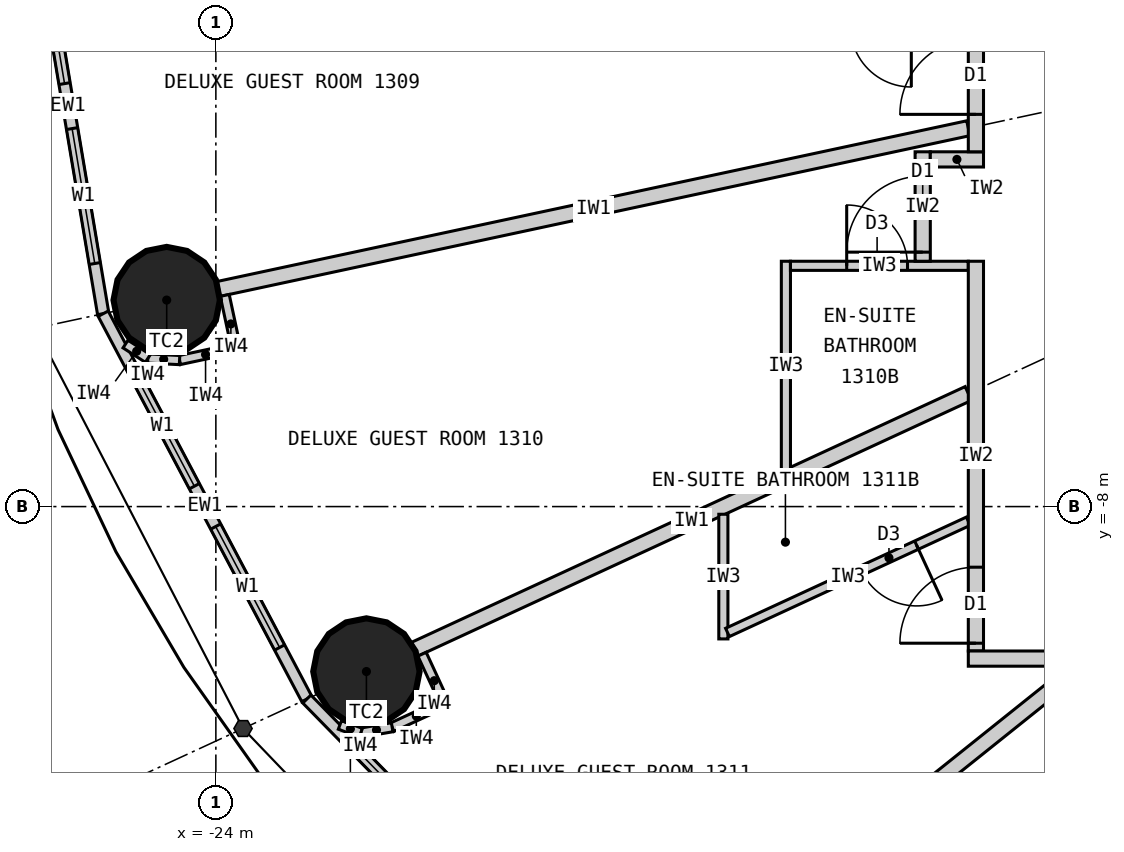
"""IFC4 building model, lengths in metres.
Left out: names, types, materials, properties, quantities, classifications, styles, units other than length and angle.
Written with IfcOpenShell. Run it as: python <this file> out.ifc"""

import sys

from ifc_helpers import new_model, si_unit, direction, frame, frame_2d, origin, origin_2d, place, context, subcontext, project, spatial, rectangle, circle, extrude, element, fill, save


model = new_model("IFC4")
c1 = context("Model", 3, precision=1e-05, world=origin(), true_north=direction((0.0, 1.0)))
c2 = subcontext(c1, "Body", "Model", "MODEL_VIEW")
j1 = project(units=[si_unit("LENGTHUNIT", "METRE"), si_unit("PLANEANGLEUNIT", "RADIAN")], contexts=[c1])
p1 = place(None, origin())
s1 = spatial("IfcSite", under=j1, at=p1, CompositionType="ELEMENT")
p2 = place(p1, origin())
s2 = spatial("IfcBuilding", under=s1, at=p2, CompositionType="ELEMENT")
p3 = place(p2, frame((0.0, 0.0, 57.3)))
s3 = spatial("IfcBuildingStorey", under=s2, at=p3, CompositionType="ELEMENT", Elevation=57.3)
for number, where, z_axis, x_axis in (
    (1, (-24.647, -5.283, 0.0), (0.0, 0.0, 1.0), (1.0, 0.0, 0.0)),
    (2, (-22.019, -10.17, 0.0), (0.0, 0.0, 1.0), (1.0, 0.0, 0.0)),
):
    element("IfcColumn", number, at=place(p3, frame(where, z_axis=z_axis, x_axis=x_axis)), inside=s3, PredefinedType="COLUMN", context=c2, shape_type="SweptSolid", body=[
        extrude(circle(Radius=0.7, at=origin_2d()), origin(), (0.0, 0.0, 1.0), 3.3),
    ])
p4 = place(p3, frame((-26.4, 0.0, 0.0), z_axis=(0.0, 0.0, 1.0), x_axis=(0.165642551694, -0.986185857264, 0.0)))
e3 = element("IfcWall", 3, at=p4, inside=s3, PredefinedType="ELEMENTEDWALL", context=c2, shape_type="SweptSolid", body=[
    extrude(rectangle(XDim=5.539, YDim=0.15, at=frame_2d((2.77, 0.0))), origin(), (0.0, 0.0, 1.0), 3.12),
])
p5 = place(p4, frame((0.669, 0.0, 0.9)))
e4 = element("IfcOpeningElement", 4, at=p5, cuts=e3, PredefinedType="OPENING", context=c2, shape_type="SweptSolid", body=[
    extrude(rectangle(XDim=1.8, YDim=1.9, at=frame_2d((0.9, 0.95))), frame((0.0, 0.085, 0.0), z_axis=(0.0, -1.0, 0.0), x_axis=(1.0, 0.0, 0.0)), (0.0, 0.0, 1.0), 0.17),
])
p6 = place(p4, frame((3.07, 0.0, 0.9)))
e5 = element("IfcOpeningElement", 5, at=p6, cuts=e3, PredefinedType="OPENING", context=c2, shape_type="SweptSolid", body=[
    extrude(rectangle(XDim=1.8, YDim=1.9, at=frame_2d((0.9, 0.95))), frame((0.0, 0.085, 0.0), z_axis=(0.0, -1.0, 0.0), x_axis=(1.0, 0.0, 0.0)), (0.0, 0.0, 1.0), 0.17),
])
p7 = place(p3, frame((-25.482, -5.462, 0.0), z_axis=(0.0, 0.0, 1.0), x_axis=(0.467296867008, -0.884100468321, 0.0)))
e6 = element("IfcWall", 6, at=p7, inside=s3, PredefinedType="ELEMENTEDWALL", context=c2, shape_type="SweptSolid", body=[
    extrude(rectangle(XDim=5.734, YDim=0.15, at=frame_2d((2.867, 0.0))), origin(), (0.0, 0.0, 1.0), 3.12),
])
p8 = place(p7, frame((0.767, 0.0, 0.9)))
e7 = element("IfcOpeningElement", 7, at=p8, cuts=e6, PredefinedType="OPENING", context=c2, shape_type="SweptSolid", body=[
    extrude(rectangle(XDim=1.8, YDim=1.9, at=frame_2d((0.9, 0.95))), frame((0.0, 0.085, 0.0), z_axis=(0.0, -1.0, 0.0), x_axis=(1.0, 0.0, 0.0)), (0.0, 0.0, 1.0), 0.17),
])
p9 = place(p7, frame((3.167, 0.0, 0.9)))
e8 = element("IfcOpeningElement", 8, at=p9, cuts=e6, PredefinedType="OPENING", context=c2, shape_type="SweptSolid", body=[
    extrude(rectangle(XDim=1.8, YDim=1.9, at=frame_2d((0.9, 0.95))), frame((0.0, 0.085, 0.0), z_axis=(0.0, -1.0, 0.0), x_axis=(1.0, 0.0, 0.0)), (0.0, 0.0, 1.0), 0.17),
])
p10 = place(p3, frame((-22.803, -10.532, 0.0), z_axis=(0.0, 0.0, 1.0), x_axis=(0.699602905915, -0.714531856557, 0.0)))
e9 = element("IfcWall", 9, at=p10, inside=s3, PredefinedType="ELEMENTEDWALL", context=c2, shape_type="SweptSolid", body=[
    extrude(rectangle(XDim=6.051, YDim=0.15, at=frame_2d((3.025, 0.0))), origin(), (0.0, 0.0, 1.0), 3.12),
])
p11 = place(p10, frame((0.926, 0.0, 0.9)))
e10 = element("IfcOpeningElement", 10, at=p11, cuts=e9, PredefinedType="OPENING", context=c2, shape_type="SweptSolid", body=[
    extrude(rectangle(XDim=1.8, YDim=1.9, at=frame_2d((0.9, 0.95))), frame((0.0, 0.085, 0.0), z_axis=(0.0, -1.0, 0.0), x_axis=(1.0, 0.0, 0.0)), (0.0, 0.0, 1.0), 0.17),
])
p12 = place(p10, frame((3.325, 0.0, 0.9)))
e11 = element("IfcOpeningElement", 11, at=p12, cuts=e9, PredefinedType="OPENING", context=c2, shape_type="SweptSolid", body=[
    extrude(rectangle(XDim=1.8, YDim=1.9, at=frame_2d((0.9, 0.95))), frame((0.0, 0.085, 0.0), z_axis=(0.0, -1.0, 0.0), x_axis=(1.0, 0.0, 0.0)), (0.0, 0.0, 1.0), 0.17),
])
p13 = place(p3, frame((-14.1, -3.022, 0.0), z_axis=(0.0, 0.0, 1.0), x_axis=(-0.977790014929, -0.209586943072, 0.0)))
e12 = element("IfcWall", 12, at=p13, inside=s3, PredefinedType="PARTITIONING", context=c2, shape_type="SweptSolid", body=[
    extrude(rectangle(XDim=10.087, YDim=0.2, at=frame_2d((5.043, 0.0))), origin(), (0.0, 0.0, 1.0), 2.32),
])
p14 = place(p3, frame((-14.1, -6.512, 0.0), z_axis=(0.0, 0.0, 1.0), x_axis=(-0.907832871056, -0.419332181247, 0.0)))
e13 = element("IfcWall", 13, at=p14, inside=s3, PredefinedType="PARTITIONING", context=c2, shape_type="SweptSolid", body=[
    extrude(rectangle(XDim=8.023, YDim=0.2, at=frame_2d((4.011, 0.0))), origin(), (0.0, 0.0, 1.0), 2.32),
])
p15 = place(p3, frame((-12.625, -10.1, 0.0), z_axis=(0.0, 0.0, 1.0), x_axis=(-0.780892451574, -0.624665493744, 0.0)))
e14 = element("IfcWall", 14, at=p15, inside=s3, PredefinedType="PARTITIONING", context=c2, shape_type="SweptSolid", body=[
    extrude(rectangle(XDim=6.045, YDim=0.2, at=frame_2d((3.022, 0.0))), origin(), (0.0, 0.0, 1.0), 2.32),
])
p16 = place(p3, frame((-16.5, -7.521, 0.0), z_axis=(0.0, 0.0, 1.0), x_axis=(0.0, 1.0, 0.0)))
e15 = element("IfcWall", 15, at=p16, inside=s3, PredefinedType="PARTITIONING", context=c2, shape_type="SweptSolid", body=[
    extrude(rectangle(XDim=2.749, YDim=0.12, at=frame_2d((1.374, 0.0))), origin(), (0.0, 0.0, 1.0), 3.12),
])
p17 = place(p3, frame((-14.1, -4.833, 0.0), z_axis=(0.0, 0.0, 1.0), x_axis=(-1.0, 0.0, 0.0)))
e16 = element("IfcWall", 16, at=p17, inside=s3, PredefinedType="PARTITIONING", context=c2, shape_type="SweptSolid", body=[
    extrude(rectangle(XDim=2.34, YDim=0.12, at=frame_2d((1.17, 0.0))), origin(), (0.0, 0.0, 1.0), 3.12),
])
p18 = place(p17, frame((0.8, 0.0, 0.0)))
e17 = element("IfcOpeningElement", 17, at=p18, cuts=e16, PredefinedType="OPENING", context=c2, shape_type="SweptSolid", body=[
    extrude(rectangle(XDim=0.8, YDim=2.1, at=frame_2d((0.4, 1.05))), frame((0.0, 0.07, 0.0), z_axis=(0.0, -1.0, 0.0), x_axis=(1.0, 0.0, 0.0)), (0.0, 0.0, 1.0), 0.14),
])
p19 = place(p3, frame((-17.323, -8.101, 0.0), z_axis=(0.0, 0.0, 1.0), x_axis=(0.0, -1.0, 0.0)))
e18 = element("IfcWall", 18, at=p19, inside=s3, PredefinedType="PARTITIONING", context=c2, shape_type="SweptSolid", body=[
    extrude(rectangle(XDim=1.64, YDim=0.12, at=frame_2d((0.82, 0.0))), origin(), (0.0, 0.0, 1.0), 3.12),
])
p20 = place(p3, frame((-14.1, -8.193, 0.0), z_axis=(0.0, 0.0, 1.0), x_axis=(-0.907836493557, -0.419324338628, 0.0)))
e19 = element("IfcWall", 19, at=p20, inside=s3, PredefinedType="PARTITIONING", context=c2, shape_type="SweptSolid", body=[
    extrude(rectangle(XDim=3.49, YDim=0.12, at=frame_2d((1.745, 0.0))), origin(), (0.0, 0.0, 1.0), 3.12),
])
p21 = place(p20, frame((0.75, 0.0, 0.0)))
e20 = element("IfcOpeningElement", 20, at=p21, cuts=e19, PredefinedType="OPENING", context=c2, shape_type="SweptSolid", body=[
    extrude(rectangle(XDim=0.8, YDim=2.1, at=frame_2d((0.4, 1.05))), frame((0.0, 0.07, 0.0), z_axis=(0.0, -1.0, 0.0), x_axis=(1.0, 0.0, 0.0)), (0.0, 0.0, 1.0), 0.14),
])
p22 = place(p3, frame((-14.7, -3.333, 0.0), z_axis=(0.0, 0.0, 1.0), x_axis=(0.0, -1.0, 0.0)))
e21 = element("IfcWall", 21, at=p22, inside=s3, PredefinedType="PARTITIONING", context=c2, shape_type="SweptSolid", body=[
    extrude(rectangle(XDim=1.44, YDim=0.2, at=frame_2d((0.72, 0.0))), origin(), (0.0, 0.0, 1.0), 3.12),
])
p23 = place(p22, frame((0.32, 0.0, 0.0)))
e22 = element("IfcOpeningElement", 22, at=p23, cuts=e21, PredefinedType="OPENING", context=c2, shape_type="SweptSolid", body=[
    extrude(rectangle(XDim=1.0, YDim=2.2, at=frame_2d((0.5, 1.1))), frame((0.0, 0.11, 0.0), z_axis=(0.0, -1.0, 0.0), x_axis=(1.0, 0.0, 0.0)), (0.0, 0.0, 1.0), 0.22),
])
p24 = place(p3, frame((-13.9, -3.433, 0.0), z_axis=(0.0, 0.0, 1.0), x_axis=(-1.0, 0.0, 0.0)))
e23 = element("IfcWall", 23, at=p24, inside=s3, PredefinedType="PARTITIONING", context=c2, shape_type="SweptSolid", body=[
    extrude(rectangle(XDim=0.7, YDim=0.2, at=frame_2d((0.35, 0.0))), origin(), (0.0, 0.0, 1.0), 2.32),
])
p25 = place(p3, frame((-14.0, 3.333, 0.0), z_axis=(0.0, 0.0, 1.0), x_axis=(0.0, -1.0, 0.0)))
e24 = element("IfcWall", 24, at=p25, inside=s3, PredefinedType="PARTITIONING", context=c2, shape_type="SweptSolid", body=[
    extrude(rectangle(XDim=6.665, YDim=0.2, at=frame_2d((3.333, 0.0))), origin(), (0.0, 0.0, 1.0), 3.12),
])
p26 = place(p25, frame((2.15, 0.0, 0.0)))
e25 = element("IfcOpeningElement", 25, at=p26, cuts=e24, PredefinedType="OPENING", context=c2, shape_type="SweptSolid", body=[
    extrude(rectangle(XDim=1.0, YDim=2.2, at=frame_2d((0.5, 1.1))), frame((0.0, 0.11, 0.0), z_axis=(0.0, -1.0, 0.0), x_axis=(1.0, 0.0, 0.0)), (0.0, 0.0, 1.0), 0.22),
])
p27 = place(p25, frame((5.173, 0.0, 0.0)))
e26 = element("IfcOpeningElement", 26, at=p27, cuts=e24, PredefinedType="OPENING", context=c2, shape_type="SweptSolid", body=[
    extrude(rectangle(XDim=1.0, YDim=2.2, at=frame_2d((0.5, 1.1))), frame((0.0, 0.11, 0.0), z_axis=(0.0, -1.0, 0.0), x_axis=(1.0, 0.0, 0.0)), (0.0, 0.0, 1.0), 0.22),
])
p28 = place(p3, frame((-14.0, -4.772, 0.0), z_axis=(0.0, 0.0, 1.0), x_axis=(0.0, -1.0, 0.0)))
e27 = element("IfcWall", 27, at=p28, inside=s3, PredefinedType="PARTITIONING", context=c2, shape_type="SweptSolid", body=[
    extrude(rectangle(XDim=5.127, YDim=0.2, at=frame_2d((2.564, 0.0))), origin(), (0.0, 0.0, 1.0), 3.12),
])
p29 = place(p28, frame((4.025, 0.0, 0.0)))
e28 = element("IfcOpeningElement", 28, at=p29, cuts=e27, PredefinedType="OPENING", context=c2, shape_type="SweptSolid", body=[
    extrude(rectangle(XDim=1.0, YDim=2.2, at=frame_2d((0.5, 1.1))), frame((0.0, 0.11, 0.0), z_axis=(0.0, -1.0, 0.0), x_axis=(1.0, 0.0, 0.0)), (0.0, 0.0, 1.0), 0.22),
])
p30 = place(p3, frame((-10.885, -10.0, 0.0), z_axis=(0.0, 0.0, 1.0), x_axis=(-1.0, 0.0, 0.0)))
e29 = element("IfcWall", 29, at=p30, inside=s3, PredefinedType="PARTITIONING", context=c2, shape_type="SweptSolid", body=[
    extrude(rectangle(XDim=3.215, YDim=0.2, at=frame_2d((1.607, 0.0))), origin(), (0.0, 0.0, 1.0), 3.12),
])
p31 = place(p3, frame((-23.883, -5.222, 0.0), z_axis=(0.0, 0.0, 1.0), x_axis=(0.209311842415, -0.977848941619, 0.0)))
e30 = element("IfcWall", 30, at=p31, inside=s3, PredefinedType="PARTITIONING", context=c2, shape_type="SweptSolid", body=[
    extrude(rectangle(XDim=0.768, YDim=0.12, at=frame_2d((0.384, 0.0))), origin(), (0.0, 0.0, 1.0), 3.12),
])
p32 = place(p3, frame((-23.793, -5.926, 0.0), z_axis=(0.0, 0.0, 1.0), x_axis=(-0.977792206673, -0.209576717621, 0.0)))
e31 = element("IfcWall", 31, at=p32, inside=s3, PredefinedType="PARTITIONING", context=c2, shape_type="SweptSolid", body=[
    extrude(rectangle(XDim=0.7, YDim=0.12, at=frame_2d((0.35, 0.0))), origin(), (0.0, 0.0, 1.0), 3.12),
])
p33 = place(p3, frame((-24.478, -6.073, 0.0), z_axis=(0.0, 0.0, 1.0), x_axis=(-0.998708262812, 0.05081147302, 0.0)))
e32 = element("IfcWall", 32, at=p33, inside=s3, PredefinedType="PARTITIONING", context=c2, shape_type="SweptSolid", body=[
    extrude(rectangle(XDim=0.418, YDim=0.12, at=frame_2d((0.209, 0.0))), origin(), (0.0, 0.0, 1.0), 3.12),
])
p34 = place(p3, frame((-24.895, -6.052, 0.0), z_axis=(0.0, 0.0, 1.0), x_axis=(-0.839495197275, 0.54336710772, 0.0)))
e33 = element("IfcWall", 33, at=p34, inside=s3, PredefinedType="PARTITIONING", context=c2, shape_type="SweptSolid", body=[
    extrude(rectangle(XDim=0.35, YDim=0.12, at=frame_2d((0.175, 0.0))), origin(), (0.0, 0.0, 1.0), 3.12),
])
p35 = place(p3, frame((-21.287, -9.942, 0.0), z_axis=(0.0, 0.0, 1.0), x_axis=(0.419259891039, -0.907866258744, 0.0)))
e34 = element("IfcWall", 34, at=p35, inside=s3, PredefinedType="PARTITIONING", context=c2, shape_type="SweptSolid", body=[
    extrude(rectangle(XDim=0.768, YDim=0.12, at=frame_2d((0.384, 0.0))), origin(), (0.0, 0.0, 1.0), 3.12),
])
p36 = place(p3, frame((-21.045, -10.61, 0.0), z_axis=(0.0, 0.0, 1.0), x_axis=(-0.907877701396, -0.419235112208, 0.0)))
e35 = element("IfcWall", 35, at=p36, inside=s3, PredefinedType="PARTITIONING", context=c2, shape_type="SweptSolid", body=[
    extrude(rectangle(XDim=0.7, YDim=0.12, at=frame_2d((0.35, 0.0))), origin(), (0.0, 0.0, 1.0), 3.12),
])
p37 = place(p3, frame((-21.68, -10.903, 0.0), z_axis=(0.0, 0.0, 1.0), x_axis=(-0.985446622073, -0.169985161247, 0.0)))
e36 = element("IfcWall", 36, at=p37, inside=s3, PredefinedType="PARTITIONING", context=c2, shape_type="SweptSolid", body=[
    extrude(rectangle(XDim=0.418, YDim=0.12, at=frame_2d((0.209, 0.0))), origin(), (0.0, 0.0, 1.0), 3.12),
])
p38 = place(p3, frame((-22.092, -10.974, 0.0), z_axis=(0.0, 0.0, 1.0), x_axis=(-0.938428160676, 0.345474437912, 0.0)))
e37 = element("IfcWall", 37, at=p38, inside=s3, PredefinedType="PARTITIONING", context=c2, shape_type="SweptSolid", body=[
    extrude(rectangle(XDim=0.294, YDim=0.12, at=frame_2d((0.147, 0.0))), origin(), (0.0, 0.0, 1.0), 3.12),
])
p39 = place(p5, origin())
e38 = element("IfcWindow", 38, at=p39, inside=s3, PartitioningType="SINGLE_PANEL", PredefinedType="WINDOW", context=c2, shape_type="SweptSolid", body=[
    extrude(rectangle(XDim=1.8, YDim=1.9, at=frame_2d((0.9, 0.95))), frame((0.0, 0.03, 0.0), z_axis=(0.0, -1.0, 0.0), x_axis=(1.0, 0.0, 0.0)), (0.0, 0.0, 1.0), 0.06),
])
fill(e4, e38)
p40 = place(p6, origin())
e39 = element("IfcWindow", 39, at=p40, inside=s3, PartitioningType="SINGLE_PANEL", PredefinedType="WINDOW", context=c2, shape_type="SweptSolid", body=[
    extrude(rectangle(XDim=1.8, YDim=1.9, at=frame_2d((0.9, 0.95))), frame((0.0, 0.03, 0.0), z_axis=(0.0, -1.0, 0.0), x_axis=(1.0, 0.0, 0.0)), (0.0, 0.0, 1.0), 0.06),
])
fill(e5, e39)
p41 = place(p8, origin())
e40 = element("IfcWindow", 40, at=p41, inside=s3, PartitioningType="SINGLE_PANEL", PredefinedType="WINDOW", context=c2, shape_type="SweptSolid", body=[
    extrude(rectangle(XDim=1.8, YDim=1.9, at=frame_2d((0.9, 0.95))), frame((0.0, 0.03, 0.0), z_axis=(0.0, -1.0, 0.0), x_axis=(1.0, 0.0, 0.0)), (0.0, 0.0, 1.0), 0.06),
])
fill(e7, e40)
p42 = place(p9, origin())
e41 = element("IfcWindow", 41, at=p42, inside=s3, PartitioningType="SINGLE_PANEL", PredefinedType="WINDOW", context=c2, shape_type="SweptSolid", body=[
    extrude(rectangle(XDim=1.8, YDim=1.9, at=frame_2d((0.9, 0.95))), frame((0.0, 0.03, 0.0), z_axis=(0.0, -1.0, 0.0), x_axis=(1.0, 0.0, 0.0)), (0.0, 0.0, 1.0), 0.06),
])
fill(e8, e41)
p43 = place(p11, origin())
e42 = element("IfcWindow", 42, at=p43, inside=s3, PartitioningType="SINGLE_PANEL", PredefinedType="WINDOW", context=c2, shape_type="SweptSolid", body=[
    extrude(rectangle(XDim=1.8, YDim=1.9, at=frame_2d((0.9, 0.95))), frame((0.0, 0.03, 0.0), z_axis=(0.0, -1.0, 0.0), x_axis=(1.0, 0.0, 0.0)), (0.0, 0.0, 1.0), 0.06),
])
fill(e10, e42)
p44 = place(p27, origin())
e43 = element("IfcDoor", 43, at=p44, inside=s3, OperationType="SINGLE_SWING_RIGHT", PredefinedType="DOOR", context=c2, shape_type="SweptSolid", body=[
    extrude(rectangle(XDim=1.0, YDim=2.2, at=frame_2d((0.5, 1.1))), frame((0.0, 0.025, 0.0), z_axis=(0.0, -1.0, 0.0), x_axis=(1.0, 0.0, 0.0)), (0.0, 0.0, 1.0), 0.05),
])
fill(e26, e43)
p45 = place(p18, origin())
e44 = element("IfcDoor", 44, at=p45, inside=s3, OperationType="SINGLE_SWING_RIGHT", PredefinedType="DOOR", context=c2, shape_type="SweptSolid", body=[
    extrude(rectangle(XDim=0.8, YDim=2.1, at=frame_2d((0.4, 1.05))), frame((0.0, 0.025, 0.0), z_axis=(0.0, -1.0, 0.0), x_axis=(1.0, 0.0, 0.0)), (0.0, 0.0, 1.0), 0.05),
])
fill(e17, e44)
p46 = place(p23, origin())
e45 = element("IfcDoor", 45, at=p46, inside=s3, OperationType="SINGLE_SWING_RIGHT", PredefinedType="DOOR", context=c2, shape_type="SweptSolid", body=[
    extrude(rectangle(XDim=1.0, YDim=2.2, at=frame_2d((0.5, 1.1))), frame((0.0, 0.025, 0.0), z_axis=(0.0, -1.0, 0.0), x_axis=(1.0, 0.0, 0.0)), (0.0, 0.0, 1.0), 0.05),
])
fill(e22, e45)
p47 = place(p21, origin())
e46 = element("IfcDoor", 46, at=p47, inside=s3, OperationType="SINGLE_SWING_LEFT", PredefinedType="DOOR", context=c2, shape_type="SweptSolid", body=[
    extrude(rectangle(XDim=0.8, YDim=2.1, at=frame_2d((0.4, 1.05))), frame((0.0, 0.025, 0.0), z_axis=(0.0, -1.0, 0.0), x_axis=(1.0, 0.0, 0.0)), (0.0, 0.0, 1.0), 0.05),
])
fill(e20, e46)
p48 = place(p29, origin())
e47 = element("IfcDoor", 47, at=p48, inside=s3, OperationType="SINGLE_SWING_RIGHT", PredefinedType="DOOR", context=c2, shape_type="SweptSolid", body=[
    extrude(rectangle(XDim=1.0, YDim=2.2, at=frame_2d((0.5, 1.1))), frame((0.0, 0.025, 0.0), z_axis=(0.0, -1.0, 0.0), x_axis=(1.0, 0.0, 0.0)), (0.0, 0.0, 1.0), 0.05),
])
fill(e28, e47)
save(model, sys.argv[1])
